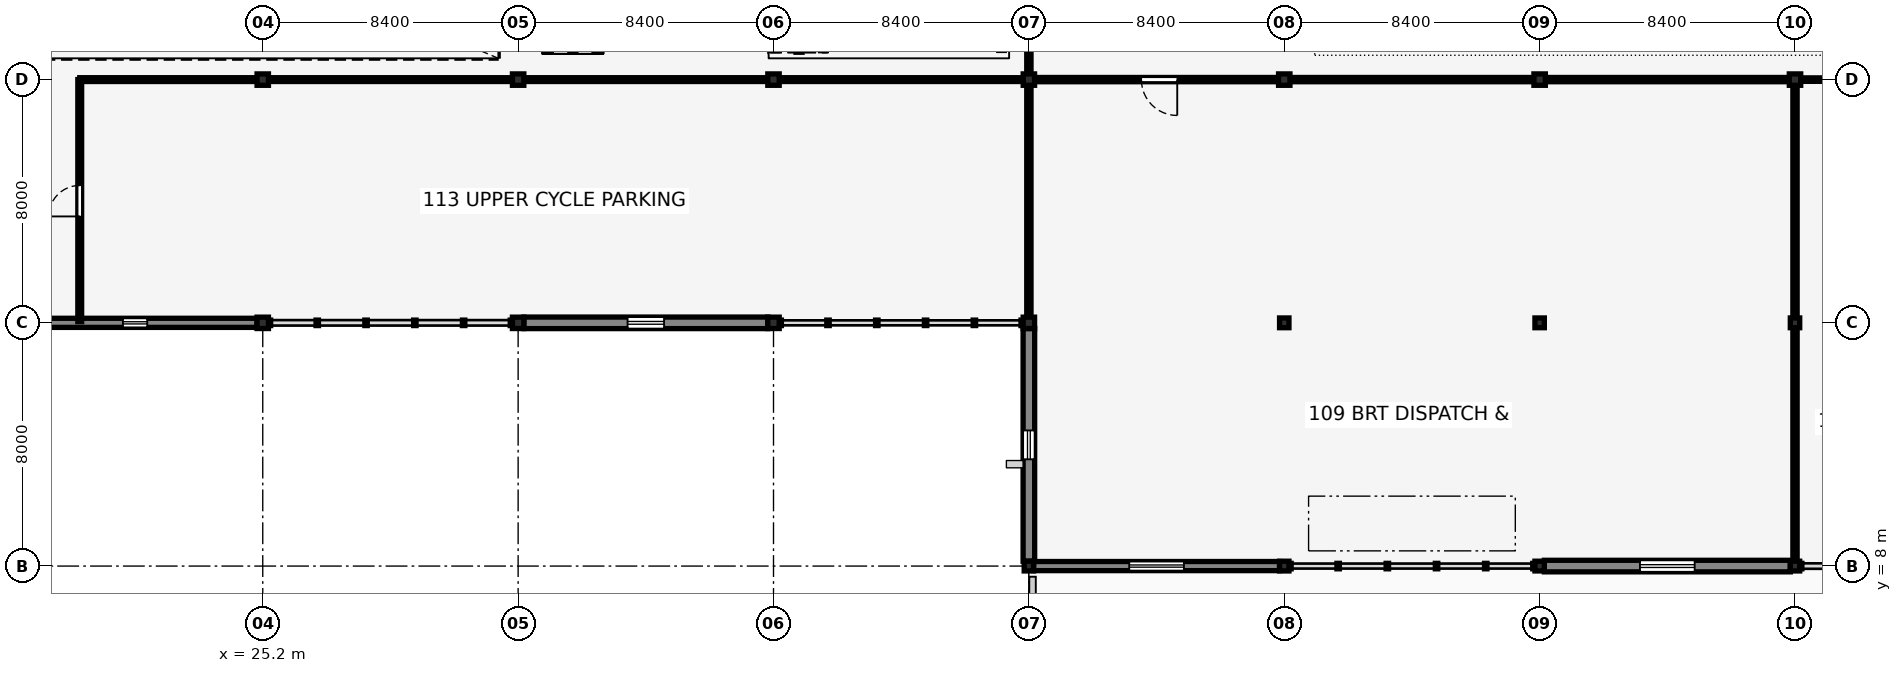
"""IFC4 building model, lengths in metres.
Left out: names, types, materials, properties, quantities, classifications, styles, units other than length and angle.
Written with IfcOpenShell. Run it as: python <this file> out.ifc"""

import sys

from ifc_helpers import new_model, si_unit, direction, frame, frame_2d, origin, origin_2d, place, context, subcontext, project, spatial, rectangle, i_section, extrude, element, fill, save


model = new_model("IFC4")
c1 = context("Model", 3, precision=1e-05, world=origin(), true_north=direction((0.0, 1.0)))
c2 = subcontext(c1, "Body", "Model", "MODEL_VIEW")
j1 = project(units=[si_unit("LENGTHUNIT", "METRE"), si_unit("PLANEANGLEUNIT", "RADIAN")], contexts=[c1])
p1 = place(None, origin())
s1 = spatial("IfcSite", under=j1, at=p1, CompositionType="ELEMENT")
p2 = place(p1, origin())
s2 = spatial("IfcBuilding", under=s1, at=p2, CompositionType="ELEMENT")
p3 = place(p2, frame((0.0, 0.0, 5.44)))
s3 = spatial("IfcBuildingStorey", under=s2, at=p3, CompositionType="ELEMENT", Elevation=5.44)
for number, where, z_axis, x_axis in (
    (1, (25.2, 16.0, 0.0), (0.0, 0.0, 1.0), (1.0, 0.0, 0.0)),
    (2, (25.2, 24.0, 0.0), (0.0, 0.0, 1.0), (1.0, 0.0, 0.0)),
    (3, (33.6, 16.0, 0.0), (0.0, 0.0, 1.0), (1.0, 0.0, 0.0)),
    (4, (33.6, 24.0, 0.0), (0.0, 0.0, 1.0), (1.0, 0.0, 0.0)),
    (5, (42.0, 16.0, 0.0), (0.0, 0.0, 1.0), (1.0, 0.0, 0.0)),
    (6, (42.0, 24.0, 0.0), (0.0, 0.0, 1.0), (1.0, 0.0, 0.0)),
):
    element("IfcColumn", number, at=place(p3, frame(where, z_axis=z_axis, x_axis=x_axis)), inside=s3, PredefinedType="COLUMN", context=c2, shape_type="SweptSolid", body=[
        extrude(i_section(OverallWidth=0.375, OverallDepth=0.375, WebThickness=0.017, FlangeThickness=0.027, FilletRadius=0.015, at=origin_2d()), origin(), (0.0, 0.0, 1.0), 3.8),
    ])
p4 = place(p3, frame((50.4, 8.0, 0.0), z_axis=(0.0, 0.0, 1.0), x_axis=(1.0, 0.0, 0.0)))
e7 = element("IfcColumn", 7, at=p4, inside=s3, PredefinedType="COLUMN", context=c2, shape_type="SweptSolid", body=[
    extrude(i_section(OverallWidth=0.309, OverallDepth=0.321, WebThickness=0.014, FlangeThickness=0.022, FilletRadius=0.015, at=origin_2d()), origin(), (0.0, 0.0, 1.0), 3.8),
])
for number, where, z_axis, x_axis in (
    (8, (50.4, 16.0, 0.0), (0.0, 0.0, 1.0), (1.0, 0.0, 0.0)),
    (9, (50.4, 24.0, 0.0), (0.0, 0.0, 1.0), (1.0, 0.0, 0.0)),
):
    element("IfcColumn", number, at=place(p3, frame(where, z_axis=z_axis, x_axis=x_axis)), inside=s3, PredefinedType="COLUMN", context=c2, shape_type="SweptSolid", body=[
        extrude(i_section(OverallWidth=0.375, OverallDepth=0.375, WebThickness=0.017, FlangeThickness=0.027, FilletRadius=0.015, at=origin_2d()), origin(), (0.0, 0.0, 1.0), 3.8),
    ])
for number, where, z_axis, x_axis in (
    (10, (58.8, 8.0, 0.0), (0.0, 0.0, 1.0), (1.0, 0.0, 0.0)),
    (11, (58.8, 16.0, 0.0), (0.0, 0.0, 1.0), (1.0, 0.0, 0.0)),
):
    element("IfcColumn", number, at=place(p3, frame(where, z_axis=z_axis, x_axis=x_axis)), inside=s3, PredefinedType="COLUMN", context=c2, shape_type="SweptSolid", body=[
        extrude(i_section(OverallWidth=0.309, OverallDepth=0.321, WebThickness=0.014, FlangeThickness=0.022, FilletRadius=0.015, at=origin_2d()), origin(), (0.0, 0.0, 1.0), 3.8),
    ])
p5 = place(p3, frame((58.8, 24.0, 0.0), z_axis=(0.0, 0.0, 1.0), x_axis=(1.0, 0.0, 0.0)))
e12 = element("IfcColumn", 12, at=p5, inside=s3, PredefinedType="COLUMN", context=c2, shape_type="SweptSolid", body=[
    extrude(i_section(OverallWidth=0.375, OverallDepth=0.375, WebThickness=0.017, FlangeThickness=0.027, FilletRadius=0.015, at=origin_2d()), origin(), (0.0, 0.0, 1.0), 3.8),
])
for number, where, z_axis, x_axis in (
    (13, (67.2, 8.0, 0.0), (0.0, 0.0, 1.0), (1.0, 0.0, 0.0)),
    (14, (67.2, 16.0, 0.0), (0.0, 0.0, 1.0), (1.0, 0.0, 0.0)),
):
    element("IfcColumn", number, at=place(p3, frame(where, z_axis=z_axis, x_axis=x_axis)), inside=s3, PredefinedType="COLUMN", context=c2, shape_type="SweptSolid", body=[
        extrude(i_section(OverallWidth=0.309, OverallDepth=0.321, WebThickness=0.014, FlangeThickness=0.022, FilletRadius=0.015, at=origin_2d()), origin(), (0.0, 0.0, 1.0), 3.8),
    ])
p6 = place(p3, frame((67.2, 24.0, 0.0), z_axis=(0.0, 0.0, 1.0), x_axis=(1.0, 0.0, 0.0)))
e15 = element("IfcColumn", 15, at=p6, inside=s3, PredefinedType="COLUMN", context=c2, shape_type="SweptSolid", body=[
    extrude(i_section(OverallWidth=0.375, OverallDepth=0.375, WebThickness=0.017, FlangeThickness=0.027, FilletRadius=0.015, at=origin_2d()), origin(), (0.0, 0.0, 1.0), 3.8),
])
for number, where, z_axis, x_axis in (
    (16, (75.6, 8.0, 0.0), (0.0, 0.0, 1.0), (1.0, 0.0, 0.0)),
    (17, (75.6, 16.0, 0.0), (0.0, 0.0, 1.0), (1.0, 0.0, 0.0)),
):
    element("IfcColumn", number, at=place(p3, frame(where, z_axis=z_axis, x_axis=x_axis)), inside=s3, PredefinedType="COLUMN", context=c2, shape_type="SweptSolid", body=[
        extrude(i_section(OverallWidth=0.309, OverallDepth=0.321, WebThickness=0.014, FlangeThickness=0.022, FilletRadius=0.015, at=origin_2d()), origin(), (0.0, 0.0, 1.0), 3.8),
    ])
p7 = place(p3, frame((75.6, 24.0, 0.0), z_axis=(0.0, 0.0, 1.0), x_axis=(1.0, 0.0, 0.0)))
e18 = element("IfcColumn", 18, at=p7, inside=s3, PredefinedType="COLUMN", context=c2, shape_type="SweptSolid", body=[
    extrude(i_section(OverallWidth=0.375, OverallDepth=0.375, WebThickness=0.017, FlangeThickness=0.027, FilletRadius=0.015, at=origin_2d()), origin(), (0.0, 0.0, 1.0), 3.8),
])
p8 = place(p3, frame((50.4, 8.16, 0.0), z_axis=(0.0, 0.0, 1.0), x_axis=(0.0, 1.0, 0.0)))
e19 = element("IfcWall", 19, at=p8, inside=s3, PredefinedType="SOLIDWALL", context=c2, shape_type="SweptSolid", body=[
    extrude(rectangle(XDim=7.652, YDim=0.38, at=frame_2d((3.826, 0.0))), origin(), (0.0, 0.0, 1.0), 3.442),
])
p9 = place(p8, frame((3.351, 0.0, 0.65), z_axis=(0.0, 0.0, 1.0), x_axis=(1.0, 0.0, 0.0)))
e20 = element("IfcOpeningElement", 20, at=p9, cuts=e19, PredefinedType="OPENING", context=c2, shape_type="SweptSolid", body=[
    extrude(rectangle(XDim=0.95, YDim=2.1, at=frame_2d((0.475, 1.05))), frame((0.0, 0.2, 0.0), z_axis=(0.0, -1.0, 0.0), x_axis=(1.0, 0.0, 0.0)), (0.0, 0.0, 1.0), 0.4),
])
p10 = place(p3, frame((16.987, 16.0, 0.0), z_axis=(0.0, 0.0, 1.0), x_axis=(1.0, 0.0, 0.0)))
e21 = element("IfcWall", 21, at=p10, inside=s3, PredefinedType="SOLIDWALL", context=c2, shape_type="SweptSolid", body=[
    extrude(rectangle(XDim=8.025, YDim=0.3, at=frame_2d((4.013, 0.0))), origin(), (0.0, 0.0, 1.0), 3.45),
])
p11 = place(p10, frame((3.613, 0.0, 0.65), z_axis=(0.0, 0.0, 1.0), x_axis=(1.0, 0.0, 0.0)))
e22 = element("IfcOpeningElement", 22, at=p11, cuts=e21, PredefinedType="OPENING", context=c2, shape_type="SweptSolid", body=[
    extrude(rectangle(XDim=0.8, YDim=1.85, at=frame_2d((0.4, 0.925))), frame((0.0, 0.16, 0.0), z_axis=(0.0, -1.0, 0.0), x_axis=(1.0, 0.0, 0.0)), (0.0, 0.0, 1.0), 0.32),
])
p12 = place(p3, frame((33.787, 16.0, 0.0), z_axis=(0.0, 0.0, 1.0), x_axis=(1.0, 0.0, 0.0)))
e23 = element("IfcWall", 23, at=p12, inside=s3, PredefinedType="SOLIDWALL", context=c2, shape_type="SweptSolid", body=[
    extrude(rectangle(XDim=8.025, YDim=0.38, at=frame_2d((4.013, 0.0))), origin(), (0.0, 0.0, 1.0), 3.45),
])
p13 = place(p12, frame((3.413, 0.0, 1.55), z_axis=(0.0, 0.0, 1.0), x_axis=(1.0, 0.0, 0.0)))
e24 = element("IfcOpeningElement", 24, at=p13, cuts=e23, PredefinedType="OPENING", context=c2, shape_type="SweptSolid", body=[
    extrude(rectangle(XDim=1.2, YDim=0.95, at=frame_2d((0.6, 0.475))), frame((0.0, 0.2, 0.0), z_axis=(0.0, -1.0, 0.0), x_axis=(1.0, 0.0, 0.0)), (0.0, 0.0, 1.0), 0.4),
])
p14 = place(p3, frame((50.555, 8.0, 0.0), z_axis=(0.0, 0.0, 1.0), x_axis=(1.0, 0.0, 0.0)))
e25 = element("IfcWall", 25, at=p14, inside=s3, PredefinedType="SOLIDWALL", context=c2, shape_type="SweptSolid", body=[
    extrude(rectangle(XDim=8.091, YDim=0.3, at=frame_2d((4.045, 0.0))), origin(), (0.0, 0.0, 1.0), 3.45),
])
p15 = place(p14, frame((3.146, 0.0, 0.9), z_axis=(0.0, 0.0, 1.0), x_axis=(1.0, 0.0, 0.0)))
e26 = element("IfcOpeningElement", 26, at=p15, cuts=e25, PredefinedType="OPENING", context=c2, shape_type="SweptSolid", body=[
    extrude(rectangle(XDim=1.8, YDim=1.45, at=frame_2d((0.9, 0.725))), frame((0.0, 0.16, 0.0), z_axis=(0.0, -1.0, 0.0), x_axis=(1.0, 0.0, 0.0)), (0.0, 0.0, 1.0), 0.32),
])
p16 = place(p3, frame((67.354, 8.0, 0.0), z_axis=(0.0, 0.0, 1.0), x_axis=(1.0, 0.0, 0.0)))
e27 = element("IfcWall", 27, at=p16, inside=s3, PredefinedType="SOLIDWALL", context=c2, shape_type="SweptSolid", body=[
    extrude(rectangle(XDim=8.091, YDim=0.38, at=frame_2d((4.045, 0.0))), origin(), (0.0, 0.0, 1.0), 3.45),
])
p17 = place(p16, frame((3.146, 0.0, 0.9), z_axis=(0.0, 0.0, 1.0), x_axis=(1.0, 0.0, 0.0)))
e28 = element("IfcOpeningElement", 28, at=p17, cuts=e27, PredefinedType="OPENING", context=c2, shape_type="SweptSolid", body=[
    extrude(rectangle(XDim=1.8, YDim=1.3, at=frame_2d((0.9, 0.65))), frame((0.0, 0.2, 0.0), z_axis=(0.0, -1.0, 0.0), x_axis=(1.0, 0.0, 0.0)), (0.0, 0.0, 1.0), 0.4),
])
p18 = place(p3, frame((50.52, 0.12, 0.0), z_axis=(0.0, 0.0, 1.0), x_axis=(0.0, 1.0, 0.0)))
e29 = element("IfcWall", 29, at=p18, inside=s3, PredefinedType="PARAPET", context=c2, shape_type="SweptSolid", body=[
    extrude(rectangle(XDim=7.53, YDim=0.215, at=frame_2d((3.765, 0.0))), origin(), (0.0, 0.0, 1.0), 1.05),
])
p19 = place(p3, frame((50.577, 24.0, 0.0), z_axis=(0.0, 0.0, 1.0), x_axis=(1.0, 0.0, 0.0)))
e30 = element("IfcWall", 30, at=p19, inside=s3, PredefinedType="PARTITIONING", context=c2, shape_type="SweptSolid", body=[
    extrude(rectangle(XDim=8.045, YDim=0.14, at=frame_2d((4.023, 0.0))), origin(), (0.0, 0.0, 1.0), 3.26),
])
p20 = place(p19, frame((4.703, 0.0, 0.0), z_axis=(0.0, 0.0, 1.0), x_axis=(-1.0, 0.0, 0.0)))
e31 = element("IfcOpeningElement", 31, at=p20, cuts=e30, PredefinedType="OPENING", context=c2, shape_type="SweptSolid", body=[
    extrude(rectangle(XDim=1.18, YDim=2.22, at=frame_2d((0.59, 1.11))), frame((0.0, 0.08, 0.0), z_axis=(0.0, -1.0, 0.0), x_axis=(1.0, 0.0, 0.0)), (0.0, 0.0, 1.0), 0.16),
])
p21 = place(p3, frame((75.777, 24.0, 0.0), z_axis=(0.0, 0.0, 1.0), x_axis=(1.0, 0.0, 0.0)))
e32 = element("IfcWall", 32, at=p21, inside=s3, PredefinedType="PARTITIONING", context=c2, shape_type="SweptSolid", body=[
    extrude(rectangle(XDim=8.078, YDim=0.115, at=frame_2d((4.039, 0.0))), origin(), (0.0, 0.0, 1.0), 3.26),
])
p22 = place(p21, frame((4.443, 0.0, 0.0), z_axis=(0.0, 0.0, 1.0), x_axis=(-1.0, 0.0, 0.0)))
e33 = element("IfcOpeningElement", 33, at=p22, cuts=e32, PredefinedType="OPENING", context=c2, shape_type="SweptSolid", body=[
    extrude(rectangle(XDim=0.92, YDim=2.12, at=frame_2d((0.46, 1.06))), frame((0.0, 0.067, 0.0), z_axis=(0.0, -1.0, 0.0), x_axis=(1.0, 0.0, 0.0)), (0.0, 0.0, 1.0), 0.135),
])
p23 = place(p3, frame((19.18, 16.04, 0.0), z_axis=(0.0, 0.0, 1.0), x_axis=(0.0, 1.0, 0.0)))
e34 = element("IfcWall", 34, at=p23, inside=s3, PredefinedType="PARTITIONING", context=c2, shape_type="SweptSolid", body=[
    extrude(rectangle(XDim=7.96, YDim=0.125, at=frame_2d((3.98, 0.0))), origin(), (0.0, 0.0, 1.0), 3.442),
])
p24 = place(p23, frame((3.46, 0.0, 0.0), z_axis=(0.0, 0.0, 1.0), x_axis=(1.0, 0.0, 0.0)))
e35 = element("IfcOpeningElement", 35, at=p24, cuts=e34, PredefinedType="OPENING", context=c2, shape_type="SweptSolid", body=[
    extrude(rectangle(XDim=1.02, YDim=2.16, at=frame_2d((0.51, 1.08))), frame((0.0, 0.073, 0.0), z_axis=(0.0, -1.0, 0.0), x_axis=(1.0, 0.0, 0.0)), (0.0, 0.0, 1.0), 0.145),
])
for number, where, z_axis, x_axis in (
    (36, (58.977, 24.0, 0.0), (0.0, 0.0, 1.0), (1.0, 0.0, 0.0)),
    (37, (67.377, 24.0, 0.0), (0.0, 0.0, 1.0), (1.0, 0.0, 0.0)),
):
    element("IfcWall", number, at=place(p3, frame(where, z_axis=z_axis, x_axis=x_axis)), inside=s3, PredefinedType="PARTITIONING", context=c2, shape_type="SweptSolid", body=[
        extrude(rectangle(XDim=8.045, YDim=0.14, at=frame_2d((4.023, 0.0))), origin(), (0.0, 0.0, 1.0), 3.26),
    ])
for number, where, z_axis, x_axis in (
    (38, (50.4, 24.177, 0.0), (0.0, 0.0, 1.0), (0.0, 1.0, 0.0)),
    (39, (50.4, 16.177, 0.0), (0.0, 0.0, 1.0), (0.0, 1.0, 0.0)),
):
    element("IfcWall", number, at=place(p3, frame(where, z_axis=z_axis, x_axis=x_axis)), inside=s3, PredefinedType="PARTITIONING", context=c2, shape_type="SweptSolid", body=[
        extrude(rectangle(XDim=7.646, YDim=0.14, at=frame_2d((3.823, 0.0))), origin(), (0.0, 0.0, 1.0), 3.337),
    ])
p25 = place(p3, frame((75.6, 8.15, 0.0), z_axis=(0.0, 0.0, 1.0), x_axis=(0.0, 1.0, 0.0)))
e40 = element("IfcWall", 40, at=p25, inside=s3, PredefinedType="PARTITIONING", context=c2, shape_type="SweptSolid", body=[
    extrude(rectangle(XDim=7.699, YDim=0.14, at=frame_2d((3.85, 0.0))), origin(), (0.0, 0.0, 1.0), 3.337),
])
p26 = place(p3, frame((75.6, 16.15, 0.0), z_axis=(0.0, 0.0, 1.0), x_axis=(0.0, 1.0, 0.0)))
e41 = element("IfcWall", 41, at=p26, inside=s3, PredefinedType="PARTITIONING", context=c2, shape_type="SweptSolid", body=[
    extrude(rectangle(XDim=7.672, YDim=0.14, at=frame_2d((3.836, 0.0))), origin(), (0.0, 0.0, 1.0), 3.337),
])
p27 = place(p3, frame((19.18, 24.0, 0.0), z_axis=(0.0, 0.0, 1.0), x_axis=(1.0, 0.0, 0.0)))
e42 = element("IfcWall", 42, at=p27, inside=s3, PredefinedType="PARTITIONING", context=c2, shape_type="SweptSolid", body=[
    extrude(rectangle(XDim=5.843, YDim=0.125, at=frame_2d((2.921, 0.0))), origin(), (0.0, 0.0, 1.0), 3.26),
])
for number, where, z_axis, x_axis in (
    (43, (25.377, 24.0, 0.0), (0.0, 0.0, 1.0), (1.0, 0.0, 0.0)),
    (44, (33.777, 24.0, 0.0), (0.0, 0.0, 1.0), (1.0, 0.0, 0.0)),
    (45, (42.177, 24.0, 0.0), (0.0, 0.0, 1.0), (1.0, 0.0, 0.0)),
):
    element("IfcWall", number, at=place(p3, frame(where, z_axis=z_axis, x_axis=x_axis)), inside=s3, PredefinedType="PARTITIONING", context=c2, shape_type="SweptSolid", body=[
        extrude(rectangle(XDim=8.045, YDim=0.125, at=frame_2d((4.023, 0.0))), origin(), (0.0, 0.0, 1.0), 3.26),
    ])
p28 = place(p9, origin())
e46 = element("IfcWindow", 46, at=p28, inside=s3, PartitioningType="SINGLE_PANEL", PredefinedType="WINDOW", context=c2, shape_type="SweptSolid", body=[
    extrude(rectangle(XDim=0.95, YDim=2.1, at=frame_2d((0.475, 1.05))), frame((0.0, 0.03, 0.0), z_axis=(0.0, -1.0, 0.0), x_axis=(1.0, 0.0, 0.0)), (0.0, 0.0, 1.0), 0.06),
])
fill(e20, e46)
p29 = place(p11, origin())
e47 = element("IfcWindow", 47, at=p29, inside=s3, PartitioningType="SINGLE_PANEL", PredefinedType="WINDOW", context=c2, shape_type="SweptSolid", body=[
    extrude(rectangle(XDim=0.8, YDim=1.85, at=frame_2d((0.4, 0.925))), frame((0.0, 0.03, 0.0), z_axis=(0.0, -1.0, 0.0), x_axis=(1.0, 0.0, 0.0)), (0.0, 0.0, 1.0), 0.06),
])
fill(e22, e47)
p30 = place(p13, origin())
e48 = element("IfcWindow", 48, at=p30, inside=s3, PartitioningType="SINGLE_PANEL", PredefinedType="WINDOW", context=c2, shape_type="SweptSolid", body=[
    extrude(rectangle(XDim=1.2, YDim=0.95, at=frame_2d((0.6, 0.475))), frame((0.0, 0.03, 0.0), z_axis=(0.0, -1.0, 0.0), x_axis=(1.0, 0.0, 0.0)), (0.0, 0.0, 1.0), 0.06),
])
fill(e24, e48)
p31 = place(p15, origin())
e49 = element("IfcWindow", 49, at=p31, inside=s3, PartitioningType="DOUBLE_PANEL_VERTICAL", PredefinedType="WINDOW", context=c2, shape_type="SweptSolid", body=[
    extrude(rectangle(XDim=1.8, YDim=1.45, at=frame_2d((0.9, 0.725))), frame((0.0, 0.03, 0.0), z_axis=(0.0, -1.0, 0.0), x_axis=(1.0, 0.0, 0.0)), (0.0, 0.0, 1.0), 0.06),
])
fill(e26, e49)
p32 = place(p17, origin())
e50 = element("IfcWindow", 50, at=p32, inside=s3, PartitioningType="DOUBLE_PANEL_VERTICAL", PredefinedType="WINDOW", context=c2, shape_type="SweptSolid", body=[
    extrude(rectangle(XDim=1.8, YDim=1.3, at=frame_2d((0.9, 0.65))), frame((0.0, 0.03, 0.0), z_axis=(0.0, -1.0, 0.0), x_axis=(1.0, 0.0, 0.0)), (0.0, 0.0, 1.0), 0.06),
])
fill(e28, e50)
p33 = place(p20, origin())
e51 = element("IfcDoor", 51, at=p33, inside=s3, OperationType="SINGLE_SWING_LEFT", PredefinedType="DOOR", context=c2, shape_type="SweptSolid", body=[
    extrude(rectangle(XDim=1.18, YDim=2.22, at=frame_2d((0.59, 1.11))), frame((0.0, 0.025, 0.0), z_axis=(0.0, -1.0, 0.0), x_axis=(1.0, 0.0, 0.0)), (0.0, 0.0, 1.0), 0.05),
])
fill(e31, e51)
p34 = place(p24, origin())
e52 = element("IfcDoor", 52, at=p34, inside=s3, OperationType="SINGLE_SWING_LEFT", PredefinedType="DOOR", context=c2, shape_type="SweptSolid", body=[
    extrude(rectangle(XDim=1.02, YDim=2.16, at=frame_2d((0.51, 1.08))), frame((0.0, 0.025, 0.0), z_axis=(0.0, -1.0, 0.0), x_axis=(1.0, 0.0, 0.0)), (0.0, 0.0, 1.0), 0.05),
])
fill(e35, e52)
save(model, sys.argv[1])
